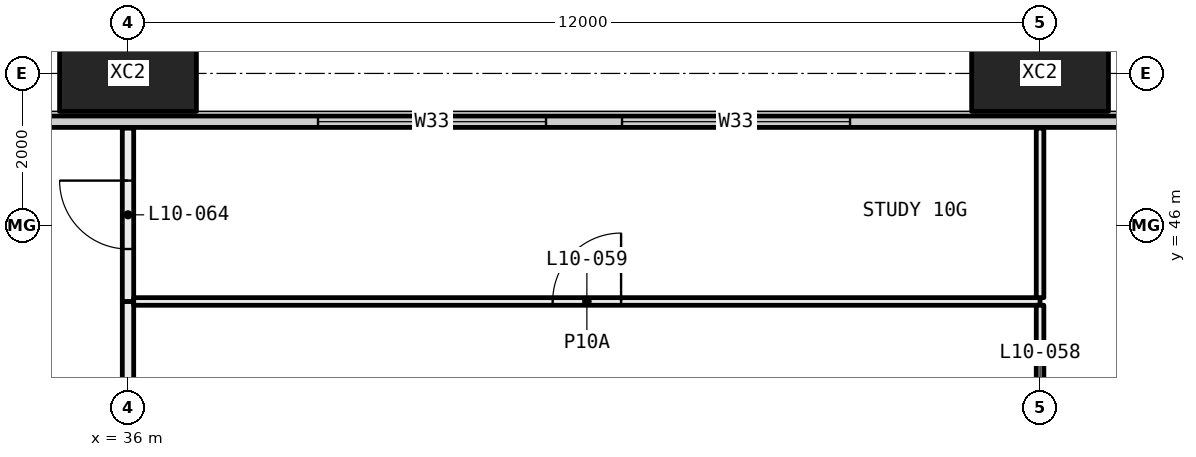
"""IFC4 building model, lengths in metres.
Left out: names, types, materials, properties, quantities, classifications, styles, units other than length and angle.
Written with IfcOpenShell. Run it as: python <this file> out.ifc"""

import sys

from ifc_helpers import new_model, si_unit, direction, frame, frame_2d, origin, origin_2d, place, context, subcontext, project, spatial, rectangle, hollow_rectangle, extrude, element, fill, save


model = new_model("IFC4")
c1 = context("Model", 3, precision=1e-05, world=origin(), true_north=direction((0.0, 1.0)))
c2 = subcontext(c1, "Body", "Model", "MODEL_VIEW")
j1 = project(units=[si_unit("LENGTHUNIT", "METRE"), si_unit("PLANEANGLEUNIT", "RADIAN")], contexts=[c1])
p1 = place(None, origin())
s1 = spatial("IfcSite", under=j1, at=p1, CompositionType="ELEMENT")
p2 = place(p1, origin())
s2 = spatial("IfcBuilding", under=s1, at=p2, CompositionType="ELEMENT")
p3 = place(p2, frame((0.0, 0.0, 47.25)))
s3 = spatial("IfcBuildingStorey", under=s2, at=p3, CompositionType="ELEMENT", Elevation=47.25)
for number, where, z_axis, x_axis in (
    (1, (36.0, 48.0, -0.4), (0.0, 0.0, 1.0), (1.0, 0.0, 0.0)),
    (2, (48.0, 48.0, -0.4), (0.0, 0.0, 1.0), (1.0, 0.0, 0.0)),
):
    element("IfcColumn", number, at=place(p3, frame(where, z_axis=z_axis, x_axis=x_axis)), inside=s3, PredefinedType="COLUMN", context=c2, shape_type="SweptSolid", body=[
        extrude(hollow_rectangle(XDim=1.8, YDim=1.0, WallThickness=0.07, at=origin_2d()), origin(), (0.0, 0.0, 1.0), 3.45),
    ])
p4 = place(p3, frame((6.56, 47.365, 0.0), z_axis=(0.0, 0.0, 1.0), x_axis=(1.0, 0.0, 0.0)))
e3 = element("IfcWall", 3, at=p4, inside=s3, PredefinedType="ELEMENTEDWALL", context=c2, shape_type="SweptSolid", body=[
    extrude(rectangle(XDim=58.88, YDim=0.15, at=frame_2d((29.44, 0.0))), origin(), (0.0, 0.0, 1.0), 3.05),
])
p5 = place(p4, frame((0.44, 0.0, 0.45)))
e4 = element("IfcOpeningElement", 4, at=p5, cuts=e3, PredefinedType="OPENING", context=c2, shape_type="SweptSolid", body=[
    extrude(rectangle(XDim=4.5, YDim=2.55, at=frame_2d((2.25, 1.275))), frame((0.0, 0.085, 0.0), z_axis=(0.0, -1.0, 0.0), x_axis=(1.0, 0.0, 0.0)), (0.0, 0.0, 1.0), 0.17),
])
p6 = place(p4, frame((7.94, 0.0, 0.45)))
e5 = element("IfcOpeningElement", 5, at=p6, cuts=e3, PredefinedType="OPENING", context=c2, shape_type="SweptSolid", body=[
    extrude(rectangle(XDim=3.0, YDim=2.55, at=frame_2d((1.5, 1.275))), frame((0.0, 0.085, 0.0), z_axis=(0.0, -1.0, 0.0), x_axis=(1.0, 0.0, 0.0)), (0.0, 0.0, 1.0), 0.17),
])
p7 = place(p4, frame((11.94, 0.0, 0.45)))
e6 = element("IfcOpeningElement", 6, at=p7, cuts=e3, PredefinedType="OPENING", context=c2, shape_type="SweptSolid", body=[
    extrude(rectangle(XDim=3.0, YDim=2.55, at=frame_2d((1.5, 1.275))), frame((0.0, 0.085, 0.0), z_axis=(0.0, -1.0, 0.0), x_axis=(1.0, 0.0, 0.0)), (0.0, 0.0, 1.0), 0.17),
])
p8 = place(p4, frame((19.94, 0.0, 0.45)))
e7 = element("IfcOpeningElement", 7, at=p8, cuts=e3, PredefinedType="OPENING", context=c2, shape_type="SweptSolid", body=[
    extrude(rectangle(XDim=3.0, YDim=2.55, at=frame_2d((1.5, 1.275))), frame((0.0, 0.085, 0.0), z_axis=(0.0, -1.0, 0.0), x_axis=(1.0, 0.0, 0.0)), (0.0, 0.0, 1.0), 0.17),
])
p9 = place(p4, frame((23.94, 0.0, 0.45)))
e8 = element("IfcOpeningElement", 8, at=p9, cuts=e3, PredefinedType="OPENING", context=c2, shape_type="SweptSolid", body=[
    extrude(rectangle(XDim=2.0, YDim=2.55, at=frame_2d((1.0, 1.275))), frame((0.0, 0.085, 0.0), z_axis=(0.0, -1.0, 0.0), x_axis=(1.0, 0.0, 0.0)), (0.0, 0.0, 1.0), 0.17),
])
p10 = place(p4, frame((31.94, 0.0, 0.45)))
e9 = element("IfcOpeningElement", 9, at=p10, cuts=e3, PredefinedType="OPENING", context=c2, shape_type="SweptSolid", body=[
    extrude(rectangle(XDim=3.0, YDim=2.55, at=frame_2d((1.5, 1.275))), frame((0.0, 0.085, 0.0), z_axis=(0.0, -1.0, 0.0), x_axis=(1.0, 0.0, 0.0)), (0.0, 0.0, 1.0), 0.17),
])
p11 = place(p4, frame((35.94, 0.0, 0.45)))
e10 = element("IfcOpeningElement", 10, at=p11, cuts=e3, PredefinedType="OPENING", context=c2, shape_type="SweptSolid", body=[
    extrude(rectangle(XDim=3.0, YDim=2.55, at=frame_2d((1.5, 1.275))), frame((0.0, 0.085, 0.0), z_axis=(0.0, -1.0, 0.0), x_axis=(1.0, 0.0, 0.0)), (0.0, 0.0, 1.0), 0.17),
])
p12 = place(p4, frame((43.94, 0.0, 0.45)))
e11 = element("IfcOpeningElement", 11, at=p12, cuts=e3, PredefinedType="OPENING", context=c2, shape_type="SweptSolid", body=[
    extrude(rectangle(XDim=3.0, YDim=2.55, at=frame_2d((1.5, 1.275))), frame((0.0, 0.085, 0.0), z_axis=(0.0, -1.0, 0.0), x_axis=(1.0, 0.0, 0.0)), (0.0, 0.0, 1.0), 0.17),
])
p13 = place(p4, frame((47.94, 0.0, 0.45)))
e12 = element("IfcOpeningElement", 12, at=p13, cuts=e3, PredefinedType="OPENING", context=c2, shape_type="SweptSolid", body=[
    extrude(rectangle(XDim=2.0, YDim=2.55, at=frame_2d((1.0, 1.275))), frame((0.0, 0.085, 0.0), z_axis=(0.0, -1.0, 0.0), x_axis=(1.0, 0.0, 0.0)), (0.0, 0.0, 1.0), 0.17),
])
p14 = place(p4, frame((53.94, 0.0, 0.45)))
e13 = element("IfcOpeningElement", 13, at=p14, cuts=e3, PredefinedType="OPENING", context=c2, shape_type="SweptSolid", body=[
    extrude(rectangle(XDim=4.5, YDim=2.55, at=frame_2d((2.25, 1.275))), frame((0.0, 0.085, 0.0), z_axis=(0.0, -1.0, 0.0), x_axis=(1.0, 0.0, 0.0)), (0.0, 0.0, 1.0), 0.17),
])
p15 = place(p3, frame((36.0, 43.755, 0.0), z_axis=(0.0, 0.0, 1.0), x_axis=(0.0, 1.0, 0.0)))
e14 = element("IfcWall", 14, at=p15, inside=s3, PredefinedType="PARTITIONING", context=c2, shape_type="SweptSolid", body=[
    extrude(rectangle(XDim=1.245, YDim=0.15, at=frame_2d((0.623, 0.0))), origin(), (0.0, 0.0, 1.0), 2.45),
])
p16 = place(p3, frame((36.0, 45.0, 0.0), z_axis=(0.0, 0.0, 1.0), x_axis=(0.0, 1.0, 0.0)))
e15 = element("IfcWall", 15, at=p16, inside=s3, PredefinedType="PARTITIONING", context=c2, shape_type="SweptSolid", body=[
    extrude(rectangle(XDim=2.28, YDim=0.15, at=frame_2d((1.14, 0.0))), origin(), (0.0, 0.0, 1.0), 2.45),
])
p17 = place(p16, frame((0.69, 0.0, 0.0)))
e16 = element("IfcOpeningElement", 16, at=p17, cuts=e15, PredefinedType="OPENING", context=c2, shape_type="SweptSolid", body=[
    extrude(rectangle(XDim=0.9, YDim=2.1, at=frame_2d((0.45, 1.05))), frame((0.0, 0.085, 0.0), z_axis=(0.0, -1.0, 0.0), x_axis=(1.0, 0.0, 0.0)), (0.0, 0.0, 1.0), 0.17),
])
p18 = place(p3, frame((48.0, 45.0, 0.0), z_axis=(0.0, 0.0, 1.0), x_axis=(-1.0, 0.0, 0.0)))
e17 = element("IfcWall", 17, at=p18, inside=s3, PredefinedType="PARTITIONING", context=c2, shape_type="SweptSolid", body=[
    extrude(rectangle(XDim=11.925, YDim=0.1, at=frame_2d((5.962, 0.0))), origin(), (0.0, 0.0, 1.0), 2.45),
])
p19 = place(p18, frame((5.512, 0.0, 0.0)))
e18 = element("IfcOpeningElement", 18, at=p19, cuts=e17, PredefinedType="OPENING", context=c2, shape_type="SweptSolid", body=[
    extrude(rectangle(XDim=0.9, YDim=2.1, at=frame_2d((0.45, 1.05))), frame((0.0, 0.06, 0.0), z_axis=(0.0, -1.0, 0.0), x_axis=(1.0, 0.0, 0.0)), (0.0, 0.0, 1.0), 0.12),
])
p20 = place(p3, frame((48.0, 42.1, 0.0), z_axis=(0.0, 0.0, 1.0), x_axis=(0.0, 1.0, 0.0)))
e19 = element("IfcWall", 19, at=p20, inside=s3, PredefinedType="PARTITIONING", context=c2, shape_type="SweptSolid", body=[
    extrude(rectangle(XDim=2.85, YDim=0.1, at=frame_2d((1.425, 0.0))), origin(), (0.0, 0.0, 1.0), 3.05),
])
p21 = place(p20, frame((0.975, 0.0, 0.0)))
e20 = element("IfcOpeningElement", 20, at=p21, cuts=e19, PredefinedType="OPENING", context=c2, shape_type="SweptSolid", body=[
    extrude(rectangle(XDim=0.9, YDim=2.1, at=frame_2d((0.45, 1.05))), frame((0.0, 0.06, 0.0), z_axis=(0.0, -1.0, 0.0), x_axis=(1.0, 0.0, 0.0)), (0.0, 0.0, 1.0), 0.12),
])
p22 = place(p3, frame((48.0, 45.05, 0.0), z_axis=(0.0, 0.0, 1.0), x_axis=(0.0, 1.0, 0.0)))
e21 = element("IfcWall", 21, at=p22, inside=s3, PredefinedType="PARTITIONING", context=c2, shape_type="SweptSolid", body=[
    extrude(rectangle(XDim=2.23, YDim=0.1, at=frame_2d((1.115, 0.0))), origin(), (0.0, 0.0, 1.0), 3.05),
])
p23 = place(p10, origin())
e22 = element("IfcWindow", 22, at=p23, inside=s3, PartitioningType="SINGLE_PANEL", PredefinedType="WINDOW", context=c2, shape_type="SweptSolid", body=[
    extrude(rectangle(XDim=3.0, YDim=2.55, at=frame_2d((1.5, 1.275))), frame((0.0, 0.03, 0.0), z_axis=(0.0, -1.0, 0.0), x_axis=(1.0, 0.0, 0.0)), (0.0, 0.0, 1.0), 0.06),
])
fill(e9, e22)
p24 = place(p11, origin())
e23 = element("IfcWindow", 23, at=p24, inside=s3, PartitioningType="SINGLE_PANEL", PredefinedType="WINDOW", context=c2, shape_type="SweptSolid", body=[
    extrude(rectangle(XDim=3.0, YDim=2.55, at=frame_2d((1.5, 1.275))), frame((0.0, 0.03, 0.0), z_axis=(0.0, -1.0, 0.0), x_axis=(1.0, 0.0, 0.0)), (0.0, 0.0, 1.0), 0.06),
])
fill(e10, e23)
p25 = place(p19, frame((0.9, 0.0, 0.0), x_axis=(-1.0, 0.0, 0.0)))
e24 = element("IfcDoor", 24, at=p25, inside=s3, OperationType="SINGLE_SWING_LEFT", PredefinedType="DOOR", context=c2, shape_type="SweptSolid", body=[
    extrude(rectangle(XDim=0.9, YDim=2.1, at=frame_2d((0.45, 1.05))), frame((0.0, 0.025, 0.0), z_axis=(0.0, -1.0, 0.0), x_axis=(1.0, 0.0, 0.0)), (0.0, 0.0, 1.0), 0.05),
])
fill(e18, e24)
p26 = place(p17, origin())
e25 = element("IfcDoor", 25, at=p26, inside=s3, OperationType="SINGLE_SWING_LEFT", PredefinedType="DOOR", context=c2, shape_type="SweptSolid", body=[
    extrude(rectangle(XDim=0.9, YDim=2.1, at=frame_2d((0.45, 1.05))), frame((0.0, 0.025, 0.0), z_axis=(0.0, -1.0, 0.0), x_axis=(1.0, 0.0, 0.0)), (0.0, 0.0, 1.0), 0.05),
])
fill(e16, e25)
save(model, sys.argv[1])
